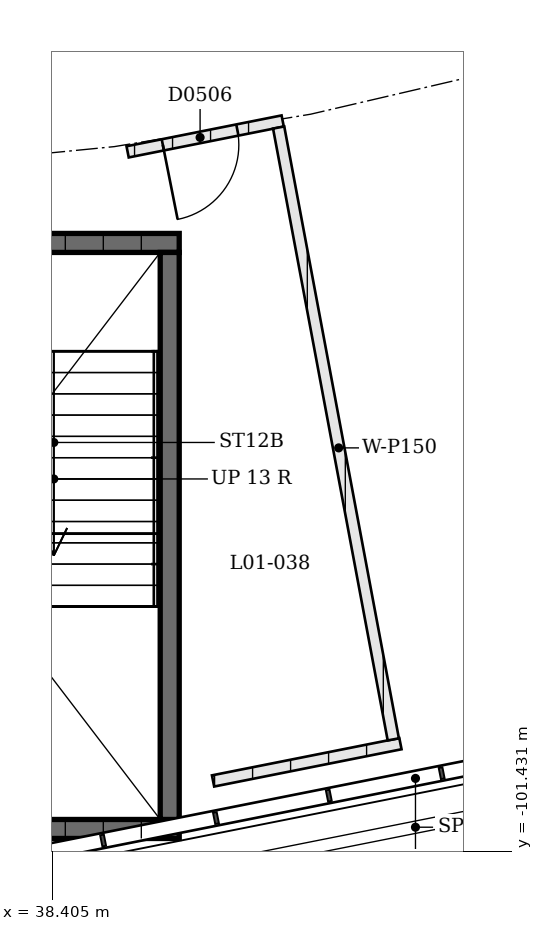
"""IFC4 building model, lengths in metres.
Left out: names, types, materials, properties, quantities, classifications, styles, units other than length and angle.
Written with IfcOpenShell. Run it as: python <this file> out.ifc"""

import sys

from ifc_helpers import new_model, si_unit, direction, frame, frame_2d, origin, place, context, subcontext, project, spatial, rectangle, extrude, element, fill, save


model = new_model("IFC4")
c1 = context("Model", 3, precision=1e-05, world=origin(), true_north=direction((0.0, 1.0)))
c2 = subcontext(c1, "Body", "Model", "MODEL_VIEW")
j1 = project(units=[si_unit("LENGTHUNIT", "METRE"), si_unit("PLANEANGLEUNIT", "RADIAN")], contexts=[c1])
p1 = place(None, origin())
s1 = spatial("IfcSite", under=j1, at=p1, CompositionType="ELEMENT")
p2 = place(p1, origin())
s2 = spatial("IfcBuilding", under=s1, at=p2, CompositionType="ELEMENT")
p3 = place(p2, frame((0.0, 0.0, 4.5)))
s3 = spatial("IfcBuildingStorey", under=s2, at=p3, CompositionType="ELEMENT", Elevation=4.5)
p4 = place(p3, frame((27.925, -93.425, 0.0), z_axis=(0.0, 0.0, 1.0), x_axis=(1.0, 0.0, 0.0)))
e1 = element("IfcWall", 1, at=p4, inside=s3, PredefinedType="SHEAR", context=c2, shape_type="SweptSolid", body=[
    extrude(rectangle(XDim=12.15, YDim=0.25, at=frame_2d((6.075, 0.0))), origin(), (0.0, 0.0, 1.0), 4.09),
])
p5 = place(p4, frame((2.2, 0.0, 0.0)))
e2 = element("IfcOpeningElement", 2, at=p5, cuts=e1, PredefinedType="OPENING", context=c2, shape_type="SweptSolid", body=[
    extrude(rectangle(XDim=1.8, YDim=2.1, at=frame_2d((0.9, 1.05))), frame((0.0, 0.125, 0.0), z_axis=(0.0, -1.0, 0.0), x_axis=(1.0, 0.0, 0.0)), (0.0, 0.0, 1.0), 0.25),
])
p6 = place(p4, frame((8.15, 0.0, 0.0)))
e3 = element("IfcOpeningElement", 3, at=p6, cuts=e1, PredefinedType="OPENING", context=c2, shape_type="SweptSolid", body=[
    extrude(rectangle(XDim=1.8, YDim=2.1, at=frame_2d((0.9, 1.05))), frame((0.0, 0.125, 0.0), z_axis=(0.0, -1.0, 0.0), x_axis=(1.0, 0.0, 0.0)), (0.0, 0.0, 1.0), 0.25),
])
p7 = place(p3, frame((27.925, -101.135, 0.0), z_axis=(0.0, 0.0, 1.0), x_axis=(1.0, 0.0, 0.0)))
e4 = element("IfcWall", 4, at=p7, inside=s3, PredefinedType="SHEAR", context=c2, shape_type="SweptSolid", body=[
    extrude(rectangle(XDim=12.15, YDim=0.25, at=frame_2d((6.075, 0.0))), origin(), (0.0, 0.0, 1.0), 4.09),
])
p8 = place(p3, frame((39.95, -93.55, 0.0), z_axis=(0.0, 0.0, 1.0), x_axis=(0.0, -1.0, 0.0)))
e5 = element("IfcWall", 5, at=p8, inside=s3, PredefinedType="SHEAR", context=c2, shape_type="SweptSolid", body=[
    extrude(rectangle(XDim=7.46, YDim=0.25, at=frame_2d((3.73, 0.0))), origin(), (0.0, 0.0, 1.0), 4.09),
])
p9 = place(p3, frame((39.396, -92.227, 0.0), z_axis=(0.0, 0.0, 1.0), x_axis=(0.980792255889, 0.195055250603, 0.0)))
e6 = element("IfcWall", 6, at=p9, inside=s3, PredefinedType="PARTITIONING", context=c2, shape_type="SweptSolid", body=[
    extrude(rectangle(XDim=2.08, YDim=0.15, at=frame_2d((1.04, 0.0))), origin(), (0.0, 0.0, 1.0), 3.0),
])
p10 = place(p9, frame((0.472, 0.0, 0.0)))
e7 = element("IfcOpeningElement", 7, at=p10, cuts=e6, PredefinedType="OPENING", context=c2, shape_type="SweptSolid", body=[
    extrude(rectangle(XDim=1.0, YDim=2.1, at=frame_2d((0.5, 1.05))), frame((0.0, 0.075, 0.0), z_axis=(0.0, -1.0, 0.0), x_axis=(1.0, 0.0, 0.0)), (0.0, 0.0, 1.0), 0.15),
])
p11 = place(p3, frame((40.52, -100.503, 0.0), z_axis=(0.0, 0.0, 1.0), x_axis=(0.980796747004, 0.195032666665, 0.0)))
e8 = element("IfcWall", 8, at=p11, inside=s3, PredefinedType="PARTITIONING", context=c2, shape_type="SweptSolid", body=[
    extrude(rectangle(XDim=2.514, YDim=0.15, at=frame_2d((1.257, 0.0))), origin(), (0.0, 0.0, 1.0), 3.0),
])
p12 = place(p3, frame((41.383, -91.906, 0.0), z_axis=(0.0, 0.0, 1.0), x_axis=(0.184160747979, -0.982896138411, 0.0)))
e9 = element("IfcWall", 9, at=p12, inside=s3, PredefinedType="PARTITIONING", context=c2, shape_type="SweptSolid", body=[
    extrude(rectangle(XDim=8.19, YDim=0.15, at=frame_2d((4.095, 0.0))), origin(), (0.0, 0.0, 1.0), 3.0),
])
p13 = place(p10, origin())
e10 = element("IfcDoor", 10, at=p13, inside=s3, OperationType="SINGLE_SWING_LEFT", PredefinedType="DOOR", context=c2, shape_type="SweptSolid", body=[
    extrude(rectangle(XDim=1.0, YDim=2.1, at=frame_2d((0.5, 1.05))), frame((0.0, 0.025, 0.0), z_axis=(0.0, -1.0, 0.0), x_axis=(1.0, 0.0, 0.0)), (0.0, 0.0, 1.0), 0.05),
])
fill(e7, e10)
save(model, sys.argv[1])
